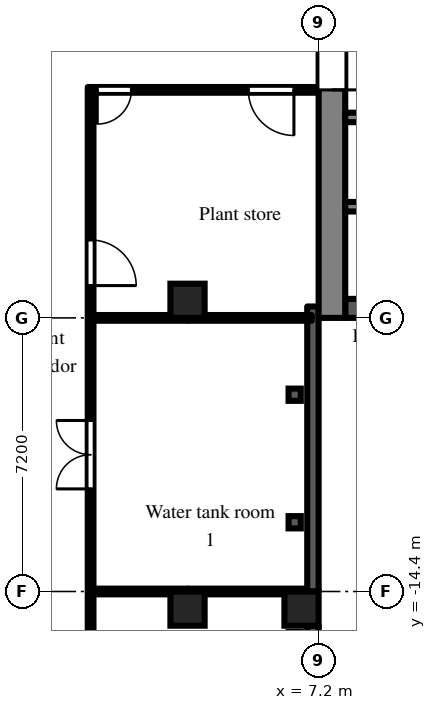
"""IFC4 building model, lengths in metres.
Left out: names, types, materials, properties, quantities, classifications, styles, units other than length and angle.
Written with IfcOpenShell. Run it as: python <this file> out.ifc"""

import sys

from ifc_helpers import new_model, si_unit, direction, frame, frame_2d, origin, origin_2d, place, context, subcontext, project, spatial, polyline, rectangle, outline, extrude, element, fill, save


model = new_model("IFC4")
c1 = context("Model", 3, precision=1e-05, world=origin(), true_north=direction((0.0, 1.0)))
c2 = subcontext(c1, "Body", "Model", "MODEL_VIEW")
j1 = project(units=[si_unit("LENGTHUNIT", "METRE"), si_unit("PLANEANGLEUNIT", "RADIAN")], contexts=[c1])
p1 = place(None, origin())
s1 = spatial("IfcSite", under=j1, at=p1, CompositionType="ELEMENT")
p2 = place(p1, origin())
s2 = spatial("IfcBuilding", under=s1, at=p2, CompositionType="ELEMENT")
p3 = place(p2, frame((0.0, 0.0, 111.9)))
s3 = spatial("IfcBuildingStorey", under=s2, at=p3, CompositionType="ELEMENT", Elevation=111.9)
for number, where, z_axis, x_axis in (
    (1, (3.75, -14.85, 0.0), (0.0, 0.0, 1.0), (1.0, 0.0, 0.0)),
    (2, (3.75, -6.75, 0.0), (0.0, 0.0, 1.0), (1.0, 0.0, 0.0)),
    (3, (6.75, -14.85, 0.0), (0.0, 0.0, 1.0), (1.0, 0.0, 0.0)),
):
    element("IfcColumn", number, at=place(p3, frame(where, z_axis=z_axis, x_axis=x_axis)), inside=s3, PredefinedType="COLUMN", context=c2, shape_type="SweptSolid", body=[
        extrude(rectangle(XDim=0.9, YDim=0.9, at=origin_2d()), origin(), (0.0, 0.0, 1.0), 4.2),
    ])
p4 = place(p3, frame((7.05, -17.1, 0.0), z_axis=(0.0, 0.0, 1.0), x_axis=(0.0, 1.0, 0.0)))
e4 = element("IfcWall", 4, at=p4, inside=s3, PredefinedType="SOLIDWALL", context=c2, shape_type="SweptSolid", body=[
    extrude(rectangle(XDim=1.8, YDim=0.3, at=frame_2d((0.9, 0.0))), origin(), (0.0, 0.0, 1.0), 3.4),
])
p5 = place(p3, frame((7.05, -14.4, 0.0), z_axis=(0.0, 0.0, 1.0), x_axis=(0.0, 1.0, 0.0)))
e5 = element("IfcWall", 5, at=p5, inside=s3, PredefinedType="SOLIDWALL", context=c2, shape_type="SweptSolid", body=[
    extrude(rectangle(XDim=7.5, YDim=0.3, at=frame_2d((3.75, 0.0))), origin(), (0.0, 0.0, 1.0), 3.8),
])
p6 = place(p3, frame((7.55, -7.2, 0.0), z_axis=(0.0, 0.0, 1.0), x_axis=(0.0, 1.0, 0.0)))
e6 = element("IfcWall", 6, at=p6, inside=s3, PredefinedType="SHEAR", context=c2, shape_type="SweptSolid", body=[
    extrude(rectangle(XDim=14.4, YDim=0.7, at=frame_2d((7.2, 0.0))), origin(), (0.0, 0.0, 1.0), 3.8),
])
p7 = place(p6, frame((6.0, 0.0, 0.0)))
e7 = element("IfcOpeningElement", 7, at=p7, cuts=e6, PredefinedType="OPENING", context=c2, shape_type="SweptSolid", body=[
    extrude(rectangle(XDim=2.4, YDim=2.2, at=frame_2d((1.2, 1.1))), frame((0.0, 0.36, 0.0), z_axis=(0.0, -1.0, 0.0), x_axis=(1.0, 0.0, 0.0)), (0.0, 0.0, 1.0), 0.72),
])
p8 = place(p3, frame((7.9, -6.95, 0.0), z_axis=(0.0, 0.0, 1.0), x_axis=(1.0, 0.0, 0.0)))
e8 = element("IfcWall", 8, at=p8, inside=s3, PredefinedType="SHEAR", context=c2, shape_type="SweptSolid", body=[
    extrude(rectangle(XDim=12.95, YDim=0.5, at=frame_2d((6.475, 0.0))), origin(), (0.0, 0.0, 1.0), 3.8),
])
p9 = place(p3, frame((7.9, -1.925, 0.0), z_axis=(0.0, 0.0, 1.0), x_axis=(1.0, 0.0, 0.0)))
e9 = element("IfcWall", 9, at=p9, inside=s3, PredefinedType="SHEAR", context=c2, shape_type="SweptSolid", body=[
    extrude(rectangle(XDim=12.95, YDim=0.25, at=frame_2d((6.475, 0.0))), origin(), (0.0, 0.0, 1.0), 3.8),
])
p10 = place(p9, frame((4.825, 0.0, 0.0)))
e10 = element("IfcOpeningElement", 10, at=p10, cuts=e9, PredefinedType="OPENING", context=c2, shape_type="SweptSolid", body=[
    extrude(rectangle(XDim=1.1, YDim=2.1, at=frame_2d((0.55, 1.05))), frame((0.0, 0.135, 0.0), z_axis=(0.0, -1.0, 0.0), x_axis=(1.0, 0.0, 0.0)), (0.0, 0.0, 1.0), 0.27),
])
p11 = place(p9, frame((7.025, 0.0, 0.0)))
e11 = element("IfcOpeningElement", 11, at=p11, cuts=e9, PredefinedType="OPENING", context=c2, shape_type="SweptSolid", body=[
    extrude(rectangle(XDim=1.1, YDim=2.1, at=frame_2d((0.55, 1.05))), frame((0.0, 0.135, 0.0), z_axis=(0.0, -1.0, 0.0), x_axis=(1.0, 0.0, 0.0)), (0.0, 0.0, 1.0), 0.27),
])
p12 = place(p9, frame((9.225, 0.0, 0.0)))
e12 = element("IfcOpeningElement", 12, at=p12, cuts=e9, PredefinedType="OPENING", context=c2, shape_type="SweptSolid", body=[
    extrude(rectangle(XDim=1.1, YDim=2.1, at=frame_2d((0.55, 1.05))), frame((0.0, 0.135, 0.0), z_axis=(0.0, -1.0, 0.0), x_axis=(1.0, 0.0, 0.0)), (0.0, 0.0, 1.0), 0.27),
])
p13 = place(p9, frame((0.525, 0.0, 0.0)))
e13 = element("IfcOpeningElement", 13, at=p13, cuts=e9, PredefinedType="OPENING", context=c2, shape_type="SweptSolid", body=[
    extrude(rectangle(XDim=0.9, YDim=2.1, at=frame_2d((0.45, 1.05))), frame((0.0, 0.135, 0.0), z_axis=(0.0, -1.0, 0.0), x_axis=(1.0, 0.0, 0.0)), (0.0, 0.0, 1.0), 0.27),
])
p14 = place(p9, frame((2.625, 0.0, 0.0)))
e14 = element("IfcOpeningElement", 14, at=p14, cuts=e9, PredefinedType="OPENING", context=c2, shape_type="SweptSolid", body=[
    extrude(rectangle(XDim=1.1, YDim=2.1, at=frame_2d((0.55, 1.05))), frame((0.0, 0.135, 0.0), z_axis=(0.0, -1.0, 0.0), x_axis=(1.0, 0.0, 0.0)), (0.0, 0.0, 1.0), 0.27),
])
p15 = place(p3, frame((7.9, -4.275, 0.0), z_axis=(0.0, 0.0, 1.0), x_axis=(1.0, 0.0, 0.0)))
e15 = element("IfcWall", 15, at=p15, inside=s3, PredefinedType="SHEAR", context=c2, shape_type="SweptSolid", body=[
    extrude(rectangle(XDim=1.95, YDim=0.25, at=frame_2d((0.975, 0.0))), origin(), (0.0, 0.0, 1.0), 3.8),
])
p16 = place(p3, frame((1.2, -36.5, 0.0), z_axis=(0.0, 0.0, 1.0), x_axis=(0.0, 1.0, 0.0)))
e16 = element("IfcWall", 16, at=p16, inside=s3, PredefinedType="PARTITIONING", context=c2, shape_type="SweptSolid", body=[
    extrude(outline(polyline([(0.0, 0.0), (35.375, 0.0), (35.375, 3.8), (13.302, 3.8), (13.3, 3.4), (12.5, 3.4), (12.498, 3.8), (0.0, 3.8), (0.0, 0.0)])), frame((0.0, 0.075, 0.0), z_axis=(0.0, -1.0, 0.0), x_axis=(1.0, 0.0, 0.0)), (0.0, 0.0, 1.0), 0.15),
])
p17 = place(p16, frame((30.15, 0.0, 0.0)))
e17 = element("IfcOpeningElement", 17, at=p17, cuts=e16, PredefinedType="OPENING", context=c2, shape_type="SweptSolid", body=[
    extrude(rectangle(XDim=1.2, YDim=2.1, at=frame_2d((0.6, 1.05))), frame((0.0, 0.085, 0.0), z_axis=(0.0, -1.0, 0.0), x_axis=(1.0, 0.0, 0.0)), (0.0, 0.0, 1.0), 0.17),
])
p18 = place(p16, frame((24.8, 0.0, 0.0)))
e18 = element("IfcOpeningElement", 18, at=p18, cuts=e16, PredefinedType="OPENING", context=c2, shape_type="SweptSolid", body=[
    extrude(rectangle(XDim=1.8, YDim=2.1, at=frame_2d((0.9, 1.05))), frame((0.0, 0.085, 0.0), z_axis=(0.0, -1.0, 0.0), x_axis=(1.0, 0.0, 0.0)), (0.0, 0.0, 1.0), 0.17),
])
p19 = place(p16, frame((17.6, 0.0, 0.0)))
e19 = element("IfcOpeningElement", 19, at=p19, cuts=e16, PredefinedType="OPENING", context=c2, shape_type="SweptSolid", body=[
    extrude(rectangle(XDim=1.8, YDim=2.1, at=frame_2d((0.9, 1.05))), frame((0.0, 0.085, 0.0), z_axis=(0.0, -1.0, 0.0), x_axis=(1.0, 0.0, 0.0)), (0.0, 0.0, 1.0), 0.17),
])
p20 = place(p16, frame((10.4, 0.0, 0.0)))
e20 = element("IfcOpeningElement", 20, at=p20, cuts=e16, PredefinedType="OPENING", context=c2, shape_type="SweptSolid", body=[
    extrude(rectangle(XDim=1.8, YDim=2.1, at=frame_2d((0.9, 1.05))), frame((0.0, 0.085, 0.0), z_axis=(0.0, -1.0, 0.0), x_axis=(1.0, 0.0, 0.0)), (0.0, 0.0, 1.0), 0.17),
])
p21 = place(p16, frame((2.95, 0.0, 0.0)))
e21 = element("IfcOpeningElement", 21, at=p21, cuts=e16, PredefinedType="OPENING", context=c2, shape_type="SweptSolid", body=[
    extrude(rectangle(XDim=1.8, YDim=2.1, at=frame_2d((0.9, 1.05))), frame((0.0, 0.085, 0.0), z_axis=(0.0, -1.0, 0.0), x_axis=(1.0, 0.0, 0.0)), (0.0, 0.0, 1.0), 0.17),
])
for number, where, z_axis, x_axis in (
    (22, (1.275, -14.4, 0.0), (0.0, 0.0, 1.0), (1.0, 0.0, 0.0)),
    (23, (1.275, -7.2, 0.0), (0.0, 0.0, 1.0), (1.0, 0.0, 0.0)),
):
    element("IfcWall", number, at=place(p3, frame(where, z_axis=z_axis, x_axis=x_axis)), inside=s3, PredefinedType="PARTITIONING", context=c2, shape_type="SweptSolid", body=[
        extrude(rectangle(XDim=2.475, YDim=0.15, at=frame_2d((1.238, 0.0))), origin(), (0.0, 0.0, 1.0), 3.8),
    ])
p22 = place(p3, frame((1.275, -1.2, 0.0), z_axis=(0.0, 0.0, 1.0), x_axis=(1.0, 0.0, 0.0)))
e24 = element("IfcWall", 24, at=p22, inside=s3, PredefinedType="PARTITIONING", context=c2, shape_type="SweptSolid", body=[
    extrude(rectangle(XDim=5.925, YDim=0.15, at=frame_2d((2.962, 0.0))), origin(), (0.0, 0.0, 1.0), 3.8),
])
p23 = place(p22, frame((0.1, 0.0, 0.0)))
e25 = element("IfcOpeningElement", 25, at=p23, cuts=e24, PredefinedType="OPENING", context=c2, shape_type="SweptSolid", body=[
    extrude(rectangle(XDim=0.9, YDim=2.1, at=frame_2d((0.45, 1.05))), frame((0.0, 0.085, 0.0), z_axis=(0.0, -1.0, 0.0), x_axis=(1.0, 0.0, 0.0)), (0.0, 0.0, 1.0), 0.17),
])
p24 = place(p22, frame((4.075, 0.0, 0.0)))
e26 = element("IfcOpeningElement", 26, at=p24, cuts=e24, PredefinedType="OPENING", context=c2, shape_type="SweptSolid", body=[
    extrude(rectangle(XDim=1.2, YDim=2.1, at=frame_2d((0.6, 1.05))), frame((0.0, 0.085, 0.0), z_axis=(0.0, -1.0, 0.0), x_axis=(1.0, 0.0, 0.0)), (0.0, 0.0, 1.0), 0.17),
])
p25 = place(p3, frame((3.75, -14.4, 0.0), z_axis=(0.0, 0.0, 1.0), x_axis=(1.0, 0.0, 0.0)))
e27 = element("IfcWall", 27, at=p25, inside=s3, PredefinedType="PARTITIONING", context=c2, shape_type="SweptSolid", body=[
    extrude(rectangle(XDim=3.15, YDim=0.15, at=frame_2d((1.575, 0.0))), origin(), (0.0, 0.0, 1.0), 3.4),
])
p26 = place(p3, frame((3.75, -7.2, 0.0), z_axis=(0.0, 0.0, 1.0), x_axis=(1.0, 0.0, 0.0)))
e28 = element("IfcWall", 28, at=p26, inside=s3, PredefinedType="PARTITIONING", context=c2, shape_type="SweptSolid", body=[
    extrude(rectangle(XDim=3.27, YDim=0.15, at=frame_2d((1.635, 0.0))), origin(), (0.0, 0.0, 1.0), 3.4),
])
p27 = place(p7, frame((2.4, 0.0, 0.0), z_axis=(0.0, 0.0, 1.0), x_axis=(-1.0, 0.0, 0.0)))
e29 = element("IfcDoor", 29, at=p27, inside=s3, OperationType="DOUBLE_DOOR_DOUBLE_SWING", PredefinedType="DOOR", context=c2, shape_type="SweptSolid", body=[
    extrude(rectangle(XDim=2.4, YDim=2.2, at=frame_2d((1.2, 1.1))), frame((0.0, 0.025, 0.0), z_axis=(0.0, -1.0, 0.0), x_axis=(1.0, 0.0, 0.0)), (0.0, 0.0, 1.0), 0.05),
])
fill(e7, e29)
p28 = place(p17, frame((1.2, 0.0, 0.0), z_axis=(0.0, 0.0, 1.0), x_axis=(-1.0, 0.0, 0.0)))
e30 = element("IfcDoor", 30, at=p28, inside=s3, OperationType="SINGLE_SWING_RIGHT", PredefinedType="DOOR", context=c2, shape_type="SweptSolid", body=[
    extrude(rectangle(XDim=1.2, YDim=2.1, at=frame_2d((0.6, 1.05))), frame((0.0, 0.025, 0.0), z_axis=(0.0, -1.0, 0.0), x_axis=(1.0, 0.0, 0.0)), (0.0, 0.0, 1.0), 0.05),
])
fill(e17, e30)
p29 = place(p23, frame((0.9, 0.0, 0.0), z_axis=(0.0, 0.0, 1.0), x_axis=(-1.0, 0.0, 0.0)))
e31 = element("IfcDoor", 31, at=p29, inside=s3, OperationType="SINGLE_SWING_RIGHT", PredefinedType="DOOR", context=c2, shape_type="SweptSolid", body=[
    extrude(rectangle(XDim=0.9, YDim=2.1, at=frame_2d((0.45, 1.05))), frame((0.0, 0.025, 0.0), z_axis=(0.0, -1.0, 0.0), x_axis=(1.0, 0.0, 0.0)), (0.0, 0.0, 1.0), 0.05),
])
fill(e25, e31)
p30 = place(p24, frame((1.2, 0.0, 0.0), z_axis=(0.0, 0.0, 1.0), x_axis=(-1.0, 0.0, 0.0)))
e32 = element("IfcDoor", 32, at=p30, inside=s3, OperationType="SINGLE_SWING_LEFT", PredefinedType="DOOR", context=c2, shape_type="SweptSolid", body=[
    extrude(rectangle(XDim=1.2, YDim=2.1, at=frame_2d((0.6, 1.05))), frame((0.0, 0.025, 0.0), z_axis=(0.0, -1.0, 0.0), x_axis=(1.0, 0.0, 0.0)), (0.0, 0.0, 1.0), 0.05),
])
fill(e26, e32)
p31 = place(p18, origin())
e33 = element("IfcDoor", 33, at=p31, inside=s3, OperationType="DOUBLE_DOOR_DOUBLE_SWING", PredefinedType="DOOR", context=c2, shape_type="SweptSolid", body=[
    extrude(rectangle(XDim=1.8, YDim=2.1, at=frame_2d((0.9, 1.05))), frame((0.0, 0.025, 0.0), z_axis=(0.0, -1.0, 0.0), x_axis=(1.0, 0.0, 0.0)), (0.0, 0.0, 1.0), 0.05),
])
fill(e18, e33)
save(model, sys.argv[1])
